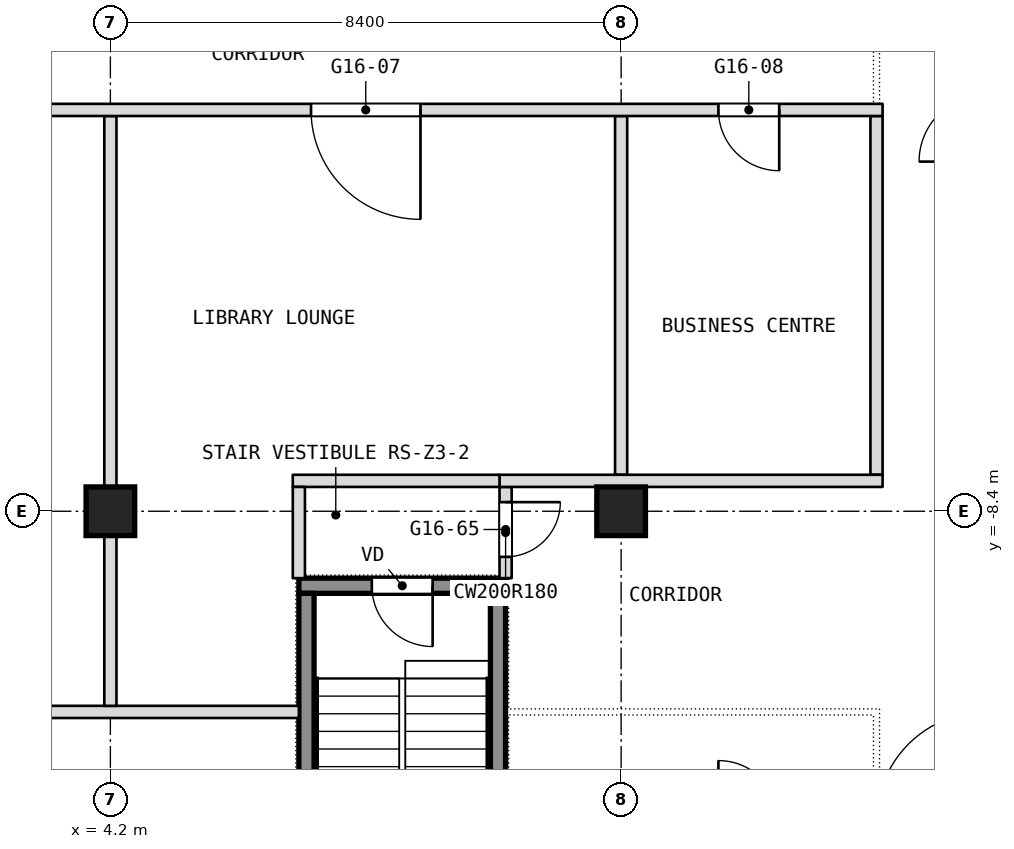
"""IFC4 building model, lengths in metres.
Left out: names, types, materials, properties, quantities, classifications, styles, units other than length and angle.
Written with IfcOpenShell. Run it as: python <this file> out.ifc"""

import sys

from ifc_helpers import new_model, si_unit, direction, frame, frame_2d, origin, origin_2d, place, context, subcontext, project, spatial, rectangle, extrude, element, fill, save


model = new_model("IFC4")
c1 = context("Model", 3, precision=1e-05, world=origin(), true_north=direction((0.0, 1.0)))
c2 = subcontext(c1, "Body", "Model", "MODEL_VIEW")
j1 = project(units=[si_unit("LENGTHUNIT", "METRE"), si_unit("PLANEANGLEUNIT", "RADIAN")], contexts=[c1])
p1 = place(None, origin())
s1 = spatial("IfcSite", under=j1, at=p1, CompositionType="ELEMENT")
p2 = place(p1, origin())
s2 = spatial("IfcBuilding", under=s1, at=p2, CompositionType="ELEMENT")
p3 = place(p2, frame((0.0, 0.0, 198.5)))
s3 = spatial("IfcBuildingStorey", under=s2, at=p3, CompositionType="ELEMENT", Elevation=198.5)
for number, where, z_axis, x_axis in (
    (1, (4.2, -8.4, 0.0), (0.0, 0.0, 1.0), (1.0, 0.0, 0.0)),
    (2, (12.6, -8.4, 0.0), (0.0, 0.0, 1.0), (1.0, 0.0, 0.0)),
):
    element("IfcColumn", number, at=place(p3, frame(where, z_axis=z_axis, x_axis=x_axis)), inside=s3, PredefinedType="COLUMN", context=c2, shape_type="SweptSolid", body=[
        extrude(rectangle(XDim=0.8, YDim=0.8, at=origin_2d()), origin(), (0.0, 0.0, 1.0), 3.6),
    ])
for number, where, z_axis, x_axis in (
    (3, (16.8, -7.8, 0.0), (0.0, 0.0, 1.0), (0.0, 1.0, 0.0)),
    (4, (12.6, -7.8, 0.0), (0.0, 0.0, 1.0), (0.0, 1.0, 0.0)),
):
    element("IfcWall", number, at=place(p3, frame(where, z_axis=z_axis, x_axis=x_axis)), inside=s3, PredefinedType="PARTITIONING", context=c2, shape_type="SweptSolid", body=[
        extrude(rectangle(XDim=5.9, YDim=0.2, at=frame_2d((2.95, 0.0))), origin(), (0.0, 0.0, 1.0), 3.34),
    ])
p4 = place(p3, frame((-7.3, -11.7, 0.0), z_axis=(0.0, 0.0, 1.0), x_axis=(1.0, 0.0, 0.0)))
e5 = element("IfcWall", 5, at=p4, inside=s3, PredefinedType="PARTITIONING", context=c2, shape_type="SweptSolid", body=[
    extrude(rectangle(XDim=14.6, YDim=0.2, at=frame_2d((7.3, 0.0))), origin(), (0.0, 0.0, 1.0), 3.34),
])
p5 = place(p3, frame((10.7, -9.5, 0.0), z_axis=(0.0, 0.0, 1.0), x_axis=(0.0, 1.0, 0.0)))
e6 = element("IfcWall", 6, at=p5, inside=s3, PredefinedType="PARTITIONING", context=c2, shape_type="SweptSolid", body=[
    extrude(rectangle(XDim=1.5, YDim=0.2, at=frame_2d((0.75, 0.0))), origin(), (0.0, 0.0, 1.0), 3.34),
])
p6 = place(p5, frame((0.35, 0.0, 0.0)))
e7 = element("IfcOpeningElement", 7, at=p6, cuts=e6, PredefinedType="OPENING", context=c2, shape_type="SweptSolid", body=[
    extrude(rectangle(XDim=0.9, YDim=2.1, at=frame_2d((0.45, 1.05))), frame((0.0, 0.1, 0.0), z_axis=(0.0, -1.0, 0.0), x_axis=(1.0, 0.0, 0.0)), (0.0, 0.0, 1.0), 0.2),
])
p7 = place(p3, frame((10.6, -7.9, 0.0), z_axis=(0.0, 0.0, 1.0), x_axis=(1.0, 0.0, 0.0)))
e8 = element("IfcWall", 8, at=p7, inside=s3, PredefinedType="PARTITIONING", context=c2, shape_type="SweptSolid", body=[
    extrude(rectangle(XDim=6.3, YDim=0.2, at=frame_2d((3.15, 0.0))), origin(), (0.0, 0.0, 1.0), 3.34),
])
p8 = place(p3, frame((7.2, -7.9, 0.0), z_axis=(0.0, 0.0, 1.0), x_axis=(1.0, 0.0, 0.0)))
e9 = element("IfcWall", 9, at=p8, inside=s3, PredefinedType="PARTITIONING", context=c2, shape_type="SweptSolid", body=[
    extrude(rectangle(XDim=3.4, YDim=0.2, at=frame_2d((1.7, 0.0))), origin(), (0.0, 0.0, 1.0), 3.34),
])
p9 = place(p3, frame((7.3, -9.5, 0.0), z_axis=(0.0, 0.0, 1.0), x_axis=(0.0, 1.0, 0.0)))
e10 = element("IfcWall", 10, at=p9, inside=s3, PredefinedType="PARTITIONING", context=c2, shape_type="SweptSolid", body=[
    extrude(rectangle(XDim=1.5, YDim=0.2, at=frame_2d((0.75, 0.0))), origin(), (0.0, 0.0, 1.0), 3.34),
])
p10 = place(p3, frame((4.2, -11.6, 0.0), z_axis=(0.0, 0.0, 1.0), x_axis=(0.0, 1.0, 0.0)))
e11 = element("IfcWall", 11, at=p10, inside=s3, PredefinedType="PARTITIONING", context=c2, shape_type="SweptSolid", body=[
    extrude(rectangle(XDim=9.7, YDim=0.2, at=frame_2d((4.85, 0.0))), origin(), (0.0, 0.0, 1.0), 3.34),
])
p11 = place(p3, frame((-16.9, -1.8, 0.0), z_axis=(0.0, 0.0, 1.0), x_axis=(1.0, 0.0, 0.0)))
e12 = element("IfcWall", 12, at=p11, inside=s3, PredefinedType="PARTITIONING", context=c2, shape_type="SweptSolid", body=[
    extrude(rectangle(XDim=33.8, YDim=0.2, at=frame_2d((16.9, 0.0))), origin(), (0.0, 0.0, 1.0), 3.34),
])
p12 = place(p11, frame((1.7, 0.0, 0.0)))
e13 = element("IfcOpeningElement", 13, at=p12, cuts=e12, PredefinedType="OPENING", context=c2, shape_type="SweptSolid", body=[
    extrude(rectangle(XDim=1.0, YDim=2.1, at=frame_2d((0.5, 1.05))), frame((0.0, 0.1, 0.0), z_axis=(0.0, -1.0, 0.0), x_axis=(1.0, 0.0, 0.0)), (0.0, 0.0, 1.0), 0.2),
])
p13 = place(p11, frame((5.9, 0.0, 0.0)))
e14 = element("IfcOpeningElement", 14, at=p13, cuts=e12, PredefinedType="OPENING", context=c2, shape_type="SweptSolid", body=[
    extrude(rectangle(XDim=1.0, YDim=2.1, at=frame_2d((0.5, 1.05))), frame((0.0, 0.1, 0.0), z_axis=(0.0, -1.0, 0.0), x_axis=(1.0, 0.0, 0.0)), (0.0, 0.0, 1.0), 0.2),
])
p14 = place(p11, frame((10.1, 0.0, 0.0)))
e15 = element("IfcOpeningElement", 15, at=p14, cuts=e12, PredefinedType="OPENING", context=c2, shape_type="SweptSolid", body=[
    extrude(rectangle(XDim=1.0, YDim=2.1, at=frame_2d((0.5, 1.05))), frame((0.0, 0.1, 0.0), z_axis=(0.0, -1.0, 0.0), x_axis=(1.0, 0.0, 0.0)), (0.0, 0.0, 1.0), 0.2),
])
p15 = place(p11, frame((16.0, 0.0, 0.0)))
e16 = element("IfcOpeningElement", 16, at=p15, cuts=e12, PredefinedType="OPENING", context=c2, shape_type="SweptSolid", body=[
    extrude(rectangle(XDim=1.8, YDim=2.1, at=frame_2d((0.9, 1.05))), frame((0.0, 0.1, 0.0), z_axis=(0.0, -1.0, 0.0), x_axis=(1.0, 0.0, 0.0)), (0.0, 0.0, 1.0), 0.2),
])
p16 = place(p11, frame((24.4, 0.0, 0.0)))
e17 = element("IfcOpeningElement", 17, at=p16, cuts=e12, PredefinedType="OPENING", context=c2, shape_type="SweptSolid", body=[
    extrude(rectangle(XDim=1.8, YDim=2.1, at=frame_2d((0.9, 1.05))), frame((0.0, 0.1, 0.0), z_axis=(0.0, -1.0, 0.0), x_axis=(1.0, 0.0, 0.0)), (0.0, 0.0, 1.0), 0.2),
])
p17 = place(p11, frame((31.1, 0.0, 0.0)))
e18 = element("IfcOpeningElement", 18, at=p17, cuts=e12, PredefinedType="OPENING", context=c2, shape_type="SweptSolid", body=[
    extrude(rectangle(XDim=1.0, YDim=2.1, at=frame_2d((0.5, 1.05))), frame((0.0, 0.1, 0.0), z_axis=(0.0, -1.0, 0.0), x_axis=(1.0, 0.0, 0.0)), (0.0, 0.0, 1.0), 0.2),
])
p18 = place(p3, frame((7.3, -9.625, 0.1), z_axis=(0.0, 0.0, 1.0), x_axis=(1.0, 0.0, 0.0)))
e19 = element("IfcWall", 19, at=p18, inside=s3, PredefinedType="SHEAR", context=c2, shape_type="SweptSolid", body=[
    extrude(rectangle(XDim=3.4, YDim=0.25, at=frame_2d((1.7, 0.0))), origin(), (0.0, 0.0, 1.0), 3.6),
])
p19 = place(p18, frame((1.2, 0.0, 0.0)))
e20 = element("IfcOpeningElement", 20, at=p19, cuts=e19, PredefinedType="OPENING", context=c2, shape_type="SweptSolid", body=[
    extrude(rectangle(XDim=1.0, YDim=2.1, at=frame_2d((0.5, 1.05))), frame((0.0, 0.125, 0.0), z_axis=(0.0, -1.0, 0.0), x_axis=(1.0, 0.0, 0.0)), (0.0, 0.0, 1.0), 0.25),
])
for number, where, z_axis, x_axis in (
    (21, (7.425, -15.45, 0.1), (0.0, 0.0, 1.0), (0.0, 1.0, 0.0)),
    (22, (10.575, -15.45, 0.1), (0.0, 0.0, 1.0), (0.0, 1.0, 0.0)),
):
    element("IfcWall", number, at=place(p3, frame(where, z_axis=z_axis, x_axis=x_axis)), inside=s3, PredefinedType="SHEAR", context=c2, shape_type="SweptSolid", body=[
        extrude(rectangle(XDim=5.7, YDim=0.25, at=frame_2d((2.85, 0.0))), origin(), (0.0, 0.0, 1.0), 3.6),
    ])
p20 = place(p6, origin())
e23 = element("IfcDoor", 23, at=p20, inside=s3, OperationType="SINGLE_SWING_RIGHT", PredefinedType="DOOR", context=c2, shape_type="SweptSolid", body=[
    extrude(rectangle(XDim=0.9, YDim=2.1, at=frame_2d((0.45, 1.05))), frame((0.0, 0.025, 0.0), z_axis=(0.0, -1.0, 0.0), x_axis=(1.0, 0.0, 0.0)), (0.0, 0.0, 1.0), 0.05),
])
fill(e7, e23)
p21 = place(p16, origin())
e24 = element("IfcDoor", 24, at=p21, inside=s3, OperationType="DOUBLE_DOOR_SINGLE_SWING", PredefinedType="DOOR", context=c2, shape_type="SweptSolid", body=[
    extrude(rectangle(XDim=1.8, YDim=2.1, at=frame_2d((0.9, 1.05))), frame((0.0, 0.025, 0.0), z_axis=(0.0, -1.0, 0.0), x_axis=(1.0, 0.0, 0.0)), (0.0, 0.0, 1.0), 0.05),
])
fill(e17, e24)
p22 = place(p17, origin())
e25 = element("IfcDoor", 25, at=p22, inside=s3, OperationType="SINGLE_SWING_LEFT", PredefinedType="DOOR", context=c2, shape_type="SweptSolid", body=[
    extrude(rectangle(XDim=1.0, YDim=2.1, at=frame_2d((0.5, 1.05))), frame((0.0, 0.025, 0.0), z_axis=(0.0, -1.0, 0.0), x_axis=(1.0, 0.0, 0.0)), (0.0, 0.0, 1.0), 0.05),
])
fill(e18, e25)
p23 = place(p19, origin())
e26 = element("IfcDoor", 26, at=p23, inside=s3, OperationType="SINGLE_SWING_LEFT", PredefinedType="DOOR", context=c2, shape_type="SweptSolid", body=[
    extrude(rectangle(XDim=1.0, YDim=2.1, at=frame_2d((0.5, 1.05))), frame((0.0, 0.025, 0.0), z_axis=(0.0, -1.0, 0.0), x_axis=(1.0, 0.0, 0.0)), (0.0, 0.0, 1.0), 0.05),
])
fill(e20, e26)
save(model, sys.argv[1])
